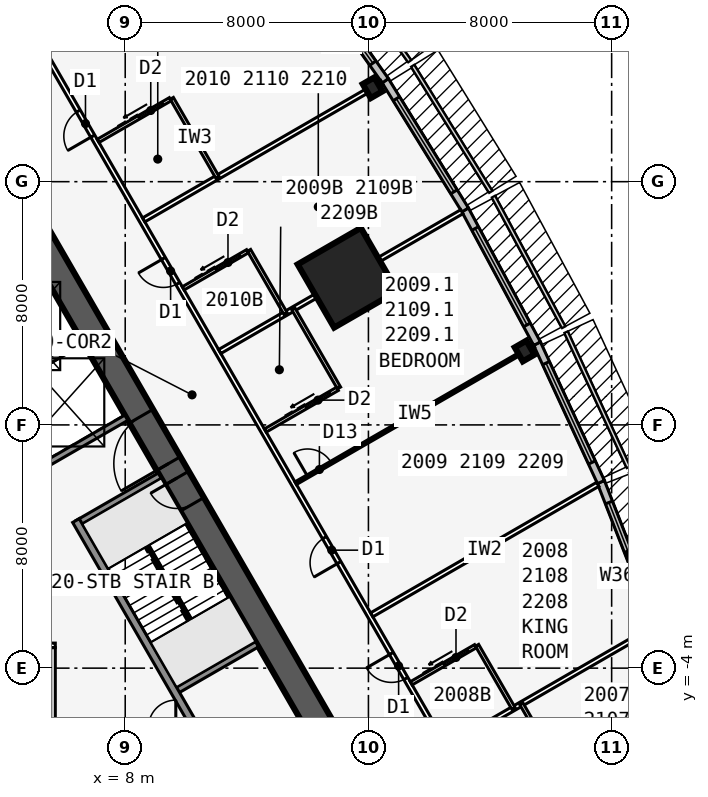
"""IFC4 building model, lengths in metres.
Left out: names, types, materials, properties, quantities, classifications, styles, units other than length and angle.
Written with IfcOpenShell. Run it as: python <this file> out.ifc"""

import sys

from ifc_helpers import new_model, si_unit, direction, frame, frame_2d, origin, origin_2d, place, context, subcontext, project, spatial, rectangle, i_section, extrude, element, fill, save


model = new_model("IFC4")
c1 = context("Model", 3, precision=1e-05, world=origin(), true_north=direction((0.0, 1.0)))
c2 = subcontext(c1, "Body", "Model", "MODEL_VIEW")
j1 = project(units=[si_unit("LENGTHUNIT", "METRE"), si_unit("PLANEANGLEUNIT", "RADIAN")], contexts=[c1])
p1 = place(None, origin())
s1 = spatial("IfcSite", under=j1, at=p1, CompositionType="ELEMENT")
p2 = place(p1, origin())
s2 = spatial("IfcBuilding", under=s1, at=p2, CompositionType="ELEMENT")
p3 = place(p2, frame((0.0, 0.0, 79.5)))
s3 = spatial("IfcBuildingStorey", under=s2, at=p3, CompositionType="ELEMENT", Elevation=79.5)
p4 = place(p3, frame((16.5, -9.526, 0.0), z_axis=(0.0, 0.0, 1.0), x_axis=(-0.499999749417, 0.866025548458, 0.0)))
e1 = element("IfcWall", 1, at=p4, inside=s3, PredefinedType="SHEAR", context=c2, shape_type="SweptSolid", body=[
    extrude(rectangle(XDim=33.0, YDim=0.9, at=frame_2d((16.5, 0.0))), origin(), (0.0, 0.0, 1.0), 3.4),
])
p5 = place(p4, frame((14.15, 0.0, 0.0)))
e2 = element("IfcOpeningElement", 2, at=p5, cuts=e1, PredefinedType="OPENING", context=c2, shape_type="SweptSolid", body=[
    extrude(rectangle(XDim=1.8, YDim=2.13, at=frame_2d((0.9, 1.065))), frame((0.0, 0.46, 0.0), z_axis=(0.0, -1.0, 0.0), x_axis=(1.0, 0.0, 0.0)), (0.0, 0.0, 1.0), 0.92),
])
p6 = place(p4, frame((12.6, 0.0, 0.0)))
e3 = element("IfcOpeningElement", 3, at=p6, cuts=e1, PredefinedType="OPENING", context=c2, shape_type="SweptSolid", body=[
    extrude(rectangle(XDim=1.0, YDim=2.13, at=frame_2d((0.5, 1.065))), frame((0.0, 0.46, 0.0), z_axis=(0.0, -1.0, 0.0), x_axis=(1.0, 0.0, 0.0)), (0.0, 0.0, 1.0), 0.92),
])
p7 = place(p3, frame((10.245, -5.843, 0.0), z_axis=(0.0, 0.0, 1.0), x_axis=(-0.499993009313, 0.866029439822, 0.0)))
e4 = element("IfcWall", 4, at=p7, inside=s3, PredefinedType="SOLIDWALL", context=c2, shape_type="SweptSolid", body=[
    extrude(rectangle(XDim=7.733, YDim=0.25, at=frame_2d((3.866, 0.0))), origin(), (0.0, 0.0, 1.0), 3.235),
])
for number, where, z_axis, x_axis in (
    (5, (9.629, -4.775, 0.0), (0.0, 0.0, 1.0), (0.866, 0.5, 0.0)),
    (6, (6.429, 0.767, 0.0), (0.0, 0.0, 1.0), (0.866, 0.5, 0.0)),
    (7, (5.329, 2.673, 0.0), (0.0, 0.0, 1.0), (0.866, 0.5, 0.0)),
    (8, (3.879, 5.184, 0.0), (0.0, 0.0, 1.0), (0.866, 0.5, 0.0)),
):
    element("IfcWall", number, at=place(p3, frame(where, z_axis=z_axis, x_axis=x_axis)), inside=s3, PredefinedType="SOLIDWALL", context=c2, shape_type="SweptSolid", body=[
        extrude(rectangle(XDim=3.125, YDim=0.2, at=frame_2d((1.562, 0.0))), origin(), (0.0, 0.0, 1.0), 3.235),
    ])
for number, where, z_axis, x_axis in (
    (9, (21.137, 6.43, 0.0), (0.0, 0.0, 1.0), (0.866, 0.5, 0.0)),
    (10, (16.137, 15.09, 0.0), (0.0, 0.0, 1.0), (0.866, 0.5, 0.0)),
):
    element("IfcColumn", number, at=place(p3, frame(where, z_axis=z_axis, x_axis=x_axis)), inside=s3, PredefinedType="COLUMN", context=c2, shape_type="SweptSolid", body=[
        extrude(i_section(OverallWidth=0.442, OverallDepth=0.531, WebThickness=0.066, FlangeThickness=0.106, at=origin_2d()), origin(), (0.0, 0.0, 1.0), 3.4),
    ])
p8 = place(p3, frame((15.312, 8.84, 0.0), z_axis=(0.0, 0.0, 1.0), x_axis=(0.866025403784, 0.5, 0.0)))
e11 = element("IfcColumn", 11, at=p8, inside=s3, PredefinedType="COLUMN", context=c2, shape_type="SweptSolid", body=[
    extrude(rectangle(XDim=2.4, YDim=2.4, at=origin_2d()), origin(), (0.0, 0.0, 1.0), 3.4),
])
p9 = place(p3, frame((25.486, -2.584, 0.0), z_axis=(0.0, 0.0, 1.0), x_axis=(-0.364013463868, 0.931393685894, 0.0)))
e12 = element("IfcWall", 12, at=p9, inside=s3, PredefinedType="STANDARD", context=c2, shape_type="SweptSolid", body=[
    extrude(rectangle(XDim=5.058, YDim=0.25, at=frame_2d((2.529, 0.0))), origin(), (0.0, 0.0, 1.0), 3.235),
])
p10 = place(p9, frame((0.729, 0.0, 0.45)))
e13 = element("IfcOpeningElement", 13, at=p10, cuts=e12, PredefinedType="OPENING", context=c2, shape_type="SweptSolid", body=[
    extrude(rectangle(XDim=3.6, YDim=2.4, at=frame_2d((1.8, 1.2))), frame((0.0, 0.135, 0.0), z_axis=(0.0, -1.0, 0.0), x_axis=(1.0, 0.0, 0.0)), (0.0, 0.0, 1.0), 0.27),
])
p11 = place(p3, frame((23.648, 2.119, 0.0), z_axis=(0.0, 0.0, 1.0), x_axis=(-0.419203100754, 0.907892482796, 0.0)))
e14 = element("IfcWall", 14, at=p11, inside=s3, PredefinedType="STANDARD", context=c2, shape_type="SweptSolid", body=[
    extrude(rectangle(XDim=5.021, YDim=0.25, at=frame_2d((2.51, 0.0))), origin(), (0.0, 0.0, 1.0), 3.235),
])
p12 = place(p11, frame((0.71, 0.0, 0.45)))
e15 = element("IfcOpeningElement", 15, at=p12, cuts=e14, PredefinedType="OPENING", context=c2, shape_type="SweptSolid", body=[
    extrude(rectangle(XDim=3.6, YDim=2.4, at=frame_2d((1.8, 1.2))), frame((0.0, 0.135, 0.0), z_axis=(0.0, -1.0, 0.0), x_axis=(1.0, 0.0, 0.0)), (0.0, 0.0, 1.0), 0.27),
])
p13 = place(p3, frame((21.547, 6.671, 0.0), z_axis=(0.0, 0.0, 1.0), x_axis=(-0.473412820489, 0.880840678782, 0.0)))
e16 = element("IfcWall", 16, at=p13, inside=s3, PredefinedType="STANDARD", context=c2, shape_type="SweptSolid", body=[
    extrude(rectangle(XDim=5.002, YDim=0.25, at=frame_2d((2.501, 0.0))), origin(), (0.0, 0.0, 1.0), 3.235),
])
p14 = place(p13, frame((0.701, 0.0, 0.45)))
e17 = element("IfcOpeningElement", 17, at=p14, cuts=e16, PredefinedType="OPENING", context=c2, shape_type="SweptSolid", body=[
    extrude(rectangle(XDim=3.6, YDim=2.4, at=frame_2d((1.8, 1.2))), frame((0.0, 0.135, 0.0), z_axis=(0.0, -1.0, 0.0), x_axis=(1.0, 0.0, 0.0)), (0.0, 0.0, 1.0), 0.27),
])
p15 = place(p3, frame((19.182, 11.071, 0.0), z_axis=(0.0, 0.0, 1.0), x_axis=(-0.526132807704, 0.850402415717, 0.0)))
e18 = element("IfcWall", 18, at=p15, inside=s3, PredefinedType="STANDARD", context=c2, shape_type="SweptSolid", body=[
    extrude(rectangle(XDim=5.002, YDim=0.25, at=frame_2d((2.501, 0.0))), origin(), (0.0, 0.0, 1.0), 3.235),
])
p16 = place(p15, frame((0.701, 0.0, 0.45)))
e19 = element("IfcOpeningElement", 19, at=p16, cuts=e18, PredefinedType="OPENING", context=c2, shape_type="SweptSolid", body=[
    extrude(rectangle(XDim=3.6, YDim=2.4, at=frame_2d((1.8, 1.2))), frame((0.0, 0.135, 0.0), z_axis=(0.0, -1.0, 0.0), x_axis=(1.0, 0.0, 0.0)), (0.0, 0.0, 1.0), 0.27),
])
p17 = place(p3, frame((16.555, 15.318, 0.0), z_axis=(0.0, 0.0, 1.0), x_axis=(-0.5766431066, 0.81699616132, 0.0)))
e20 = element("IfcWall", 20, at=p17, inside=s3, PredefinedType="STANDARD", context=c2, shape_type="SweptSolid", body=[
    extrude(rectangle(XDim=5.021, YDim=0.25, at=frame_2d((2.51, 0.0))), origin(), (0.0, 0.0, 1.0), 3.235),
])
p18 = place(p17, frame((0.71, 0.0, 0.45)))
e21 = element("IfcOpeningElement", 21, at=p18, cuts=e20, PredefinedType="OPENING", context=c2, shape_type="SweptSolid", body=[
    extrude(rectangle(XDim=3.6, YDim=2.4, at=frame_2d((1.8, 1.2))), frame((0.0, 0.135, 0.0), z_axis=(0.0, -1.0, 0.0), x_axis=(1.0, 0.0, 0.0)), (0.0, 0.0, 1.0), 0.27),
])
p19 = place(p3, frame((21.586, -11.885, 0.0), z_axis=(0.0, 0.0, 1.0), x_axis=(-0.500001915564, 0.86602429783, 0.0)))
e22 = element("IfcWall", 22, at=p19, inside=s3, PredefinedType="PARTITIONING", context=c2, shape_type="SweptSolid", body=[
    extrude(rectangle(XDim=42.172, YDim=0.15, at=frame_2d((21.086, 0.0))), origin(), (0.0, 0.0, 1.0), 3.235),
])
p20 = place(p19, frame((1.911, 0.0, 0.0)))
e23 = element("IfcOpeningElement", 23, at=p20, cuts=e22, PredefinedType="OPENING", context=c2, shape_type="SweptSolid", body=[
    extrude(rectangle(XDim=0.95, YDim=2.13, at=frame_2d((0.475, 1.065))), frame((0.0, 0.085, 0.0), z_axis=(0.0, -1.0, 0.0), x_axis=(1.0, 0.0, 0.0)), (0.0, 0.0, 1.0), 0.17),
])
p21 = place(p19, frame((8.711, 0.0, 0.0)))
e24 = element("IfcOpeningElement", 24, at=p21, cuts=e22, PredefinedType="OPENING", context=c2, shape_type="SweptSolid", body=[
    extrude(rectangle(XDim=0.95, YDim=2.13, at=frame_2d((0.475, 1.065))), frame((0.0, 0.085, 0.0), z_axis=(0.0, -1.0, 0.0), x_axis=(1.0, 0.0, 0.0)), (0.0, 0.0, 1.0), 0.17),
])
p22 = place(p19, frame((13.111, 0.0, 0.0)))
e25 = element("IfcOpeningElement", 25, at=p22, cuts=e22, PredefinedType="OPENING", context=c2, shape_type="SweptSolid", body=[
    extrude(rectangle(XDim=0.95, YDim=2.13, at=frame_2d((0.475, 1.065))), frame((0.0, 0.085, 0.0), z_axis=(0.0, -1.0, 0.0), x_axis=(1.0, 0.0, 0.0)), (0.0, 0.0, 1.0), 0.17),
])
p23 = place(p19, frame((23.711, 0.0, 0.0)))
e26 = element("IfcOpeningElement", 26, at=p23, cuts=e22, PredefinedType="OPENING", context=c2, shape_type="SweptSolid", body=[
    extrude(rectangle(XDim=0.95, YDim=2.13, at=frame_2d((0.475, 1.065))), frame((0.0, 0.085, 0.0), z_axis=(0.0, -1.0, 0.0), x_axis=(1.0, 0.0, 0.0)), (0.0, 0.0, 1.0), 0.17),
])
p24 = place(p19, frame((29.311, 0.0, 0.0)))
e27 = element("IfcOpeningElement", 27, at=p24, cuts=e22, PredefinedType="OPENING", context=c2, shape_type="SweptSolid", body=[
    extrude(rectangle(XDim=0.95, YDim=2.13, at=frame_2d((0.475, 1.065))), frame((0.0, 0.085, 0.0), z_axis=(0.0, -1.0, 0.0), x_axis=(1.0, 0.0, 0.0)), (0.0, 0.0, 1.0), 0.17),
])
p25 = place(p19, frame((39.311, 0.0, 0.0)))
e28 = element("IfcOpeningElement", 28, at=p25, cuts=e22, PredefinedType="OPENING", context=c2, shape_type="SweptSolid", body=[
    extrude(rectangle(XDim=0.95, YDim=2.13, at=frame_2d((0.475, 1.065))), frame((0.0, 0.085, 0.0), z_axis=(0.0, -1.0, 0.0), x_axis=(1.0, 0.0, 0.0)), (0.0, 0.0, 1.0), 0.17),
])
p26 = place(p3, frame((18.608, -6.577, 0.0), z_axis=(0.0, 0.0, 1.0), x_axis=(0.866034818847, 0.499983692279, 0.0)))
e29 = element("IfcWall", 29, at=p26, inside=s3, PredefinedType="PARTITIONING", context=c2, shape_type="SweptSolid", body=[
    extrude(rectangle(XDim=7.82, YDim=0.15, at=frame_2d((3.91, 0.0))), origin(), (0.0, 0.0, 1.0), 2.389),
])
p27 = place(p3, frame((16.108, -2.247, 0.0), z_axis=(0.0, 0.0, 1.0), x_axis=(0.866018881988, 0.500011295912, 0.0)))
e30 = element("IfcWall", 30, at=p27, inside=s3, PredefinedType="PARTITIONING", context=c2, shape_type="SweptSolid", body=[
    extrude(rectangle(XDim=8.585, YDim=0.15, at=frame_2d((4.292, 0.0))), origin(), (0.0, 0.0, 1.0), 2.389),
])
p28 = place(p3, frame((13.608, 2.083, 0.0), z_axis=(0.0, 0.0, 1.0), x_axis=(0.866028232062, 0.499995101247, 0.0)))
e31 = element("IfcWall", 31, at=p28, inside=s3, PredefinedType="PARTITIONING", context=c2, shape_type="SweptSolid", body=[
    extrude(rectangle(XDim=9.043, YDim=0.1, at=frame_2d((4.521, 0.0))), origin(), (0.0, 0.0, 1.0), 2.389),
])
p29 = place(p28, frame((0.45, 0.0, 0.0)))
e32 = element("IfcOpeningElement", 32, at=p29, cuts=e31, PredefinedType="OPENING", context=c2, shape_type="SweptSolid", body=[
    extrude(rectangle(XDim=0.9, YDim=2.13, at=frame_2d((0.45, 1.065))), frame((0.0, 0.06, 0.0), z_axis=(0.0, -1.0, 0.0), x_axis=(1.0, 0.0, 0.0)), (0.0, 0.0, 1.0), 0.12),
])
p30 = place(p3, frame((11.108, 6.413, 0.0), z_axis=(0.0, 0.0, 1.0), x_axis=(0.866022450903, 0.500005114506, 0.0)))
e33 = element("IfcWall", 33, at=p30, inside=s3, PredefinedType="PARTITIONING", context=c2, shape_type="SweptSolid", body=[
    extrude(rectangle(XDim=9.196, YDim=0.15, at=frame_2d((4.598, 0.0))), origin(), (0.0, 0.0, 1.0), 2.389),
])
p31 = place(p3, frame((8.608, 10.743, 0.0), z_axis=(0.0, 0.0, 1.0), x_axis=(0.866028232062, 0.499995101247, 0.0)))
e34 = element("IfcWall", 34, at=p31, inside=s3, PredefinedType="PARTITIONING", context=c2, shape_type="SweptSolid", body=[
    extrude(rectangle(XDim=9.043, YDim=0.15, at=frame_2d((4.521, 0.0))), origin(), (0.0, 0.0, 1.0), 2.389),
])
p32 = place(p3, frame((22.533, -7.775, 0.0), z_axis=(0.0, 0.0, 1.0), x_axis=(-0.499990139034, 0.866031096941, 0.0)))
e35 = element("IfcWall", 35, at=p32, inside=s3, PredefinedType="PLUMBINGWALL", context=c2, shape_type="SweptSolid", body=[
    extrude(rectangle(XDim=3.0, YDim=0.12, at=frame_2d((1.5, 0.0))), origin(), (0.0, 0.0, 1.0), 3.235),
])
p33 = place(p3, frame((20.773, -5.327, 0.0), z_axis=(0.0, 0.0, 1.0), x_axis=(-0.500001309137, 0.866024647952, 0.0)))
e36 = element("IfcWall", 36, at=p33, inside=s3, PredefinedType="PLUMBINGWALL", context=c2, shape_type="SweptSolid", body=[
    extrude(rectangle(XDim=2.4, YDim=0.12, at=frame_2d((1.2, 0.0))), origin(), (0.0, 0.0, 1.0), 3.235),
])
p34 = place(p3, frame((17.408, -4.499, 0.0), z_axis=(0.0, 0.0, 1.0), x_axis=(0.866023955769, 0.500002508028, 0.0)))
e37 = element("IfcWall", 37, at=p34, inside=s3, PredefinedType="PLUMBINGWALL", context=c2, shape_type="SweptSolid", body=[
    extrude(rectangle(XDim=2.44, YDim=0.12, at=frame_2d((1.22, 0.0))), origin(), (0.0, 0.0, 1.0), 3.235),
])
p35 = place(p34, frame((1.25, 0.0, 0.0)))
e38 = element("IfcOpeningElement", 38, at=p35, cuts=e37, PredefinedType="OPENING", context=c2, shape_type="SweptSolid", body=[
    extrude(rectangle(XDim=0.9, YDim=2.13, at=frame_2d((0.45, 1.065))), frame((0.0, 0.07, 0.0), z_axis=(0.0, -1.0, 0.0), x_axis=(1.0, 0.0, 0.0)), (0.0, 0.0, 1.0), 0.14),
])
p36 = place(p3, frame((15.033, 5.215, 0.0), z_axis=(0.0, 0.0, 1.0), x_axis=(-0.50002537861, 0.866010750942, 0.0)))
e39 = element("IfcWall", 39, at=p36, inside=s3, PredefinedType="PLUMBINGWALL", context=c2, shape_type="SweptSolid", body=[
    extrude(rectangle(XDim=3.0, YDim=0.12, at=frame_2d((1.5, 0.0))), origin(), (0.0, 0.0, 1.0), 3.235),
])
p37 = place(p3, frame((12.608, 3.815, 0.0), z_axis=(0.0, 0.0, 1.0), x_axis=(0.866035715982, 0.499982138324, 0.0)))
e40 = element("IfcWall", 40, at=p37, inside=s3, PredefinedType="PLUMBINGWALL", context=c2, shape_type="SweptSolid", body=[
    extrude(rectangle(XDim=2.74, YDim=0.12, at=frame_2d((1.37, 0.0))), origin(), (0.0, 0.0, 1.0), 3.235),
])
p38 = place(p37, frame((1.55, 0.0, 0.0)))
e41 = element("IfcOpeningElement", 41, at=p38, cuts=e40, PredefinedType="OPENING", context=c2, shape_type="SweptSolid", body=[
    extrude(rectangle(XDim=0.9, YDim=2.13, at=frame_2d((0.45, 1.065))), frame((0.0, 0.07, 0.0), z_axis=(0.0, -1.0, 0.0), x_axis=(1.0, 0.0, 0.0)), (0.0, 0.0, 1.0), 0.14),
])
p39 = place(p3, frame((13.273, 7.663, 0.0), z_axis=(0.0, 0.0, 1.0), x_axis=(-0.499957262057, 0.866050077142, 0.0)))
e42 = element("IfcWall", 42, at=p39, inside=s3, PredefinedType="PLUMBINGWALL", context=c2, shape_type="SweptSolid", body=[
    extrude(rectangle(XDim=2.4, YDim=0.12, at=frame_2d((1.2, 0.0))), origin(), (0.0, 0.0, 1.0), 3.235),
])
p40 = place(p3, frame((9.908, 8.492, 0.0), z_axis=(0.0, 0.0, 1.0), x_axis=(0.866023955769, 0.500002508028, 0.0)))
e43 = element("IfcWall", 43, at=p40, inside=s3, PredefinedType="PLUMBINGWALL", context=c2, shape_type="SweptSolid", body=[
    extrude(rectangle(XDim=2.44, YDim=0.12, at=frame_2d((1.22, 0.0))), origin(), (0.0, 0.0, 1.0), 3.235),
])
p41 = place(p40, frame((1.25, 0.0, 0.0)))
e44 = element("IfcOpeningElement", 44, at=p41, cuts=e43, PredefinedType="OPENING", context=c2, shape_type="SweptSolid", body=[
    extrude(rectangle(XDim=0.9, YDim=2.13, at=frame_2d((0.45, 1.065))), frame((0.0, 0.07, 0.0), z_axis=(0.0, -1.0, 0.0), x_axis=(1.0, 0.0, 0.0)), (0.0, 0.0, 1.0), 0.14),
])
p42 = place(p3, frame((11.033, 12.143, 0.0), z_axis=(0.0, 0.0, 1.0), x_axis=(-0.50002537861, 0.866010750942, 0.0)))
e45 = element("IfcWall", 45, at=p42, inside=s3, PredefinedType="PLUMBINGWALL", context=c2, shape_type="SweptSolid", body=[
    extrude(rectangle(XDim=3.0, YDim=0.12, at=frame_2d((1.5, 0.0))), origin(), (0.0, 0.0, 1.0), 3.235),
])
p43 = place(p3, frame((7.108, 13.341, 0.0), z_axis=(0.0, 0.0, 1.0), x_axis=(0.866035715982, 0.499982138324, 0.0)))
e46 = element("IfcWall", 46, at=p43, inside=s3, PredefinedType="PLUMBINGWALL", context=c2, shape_type="SweptSolid", body=[
    extrude(rectangle(XDim=2.74, YDim=0.12, at=frame_2d((1.37, 0.0))), origin(), (0.0, 0.0, 1.0), 3.235),
])
p44 = place(p43, frame((1.55, 0.0, 0.0)))
e47 = element("IfcOpeningElement", 47, at=p44, cuts=e46, PredefinedType="OPENING", context=c2, shape_type="SweptSolid", body=[
    extrude(rectangle(XDim=0.9, YDim=2.13, at=frame_2d((0.45, 1.065))), frame((0.0, 0.07, 0.0), z_axis=(0.0, -1.0, 0.0), x_axis=(1.0, 0.0, 0.0)), (0.0, 0.0, 1.0), 0.14),
])
p45 = place(p3, frame((-2.65, -3.251, 0.0), z_axis=(0.0, 0.0, 1.0), x_axis=(1.0, 0.0, 0.0)))
e48 = element("IfcWall", 48, at=p45, inside=s3, PredefinedType="PARTITIONING", context=c2, shape_type="SweptSolid", body=[
    extrude(rectangle(XDim=8.35, YDim=0.15, at=frame_2d((4.175, 0.0))), origin(), (0.0, 0.0, 1.0), 3.235),
])
p46 = place(p3, frame((5.625, -5.826, 0.0), z_axis=(0.0, 0.0, 1.0), x_axis=(0.0, 1.0, 0.0)))
e49 = element("IfcWall", 49, at=p46, inside=s3, PredefinedType="PARTITIONING", context=c2, shape_type="SweptSolid", body=[
    extrude(rectangle(XDim=2.5, YDim=0.15, at=frame_2d((1.25, 0.0))), origin(), (0.0, 0.0, 1.0), 3.235),
])
p47 = place(p3, frame((10.135, -2.401, 0.0), z_axis=(0.0, 0.0, 1.0), x_axis=(-0.499992232847, 0.866029888106, 0.0)))
e50 = element("IfcWall", 50, at=p47, inside=s3, PredefinedType="SOLIDWALL", context=c2, shape_type="SweptSolid", body=[
    extrude(rectangle(XDim=2.794, YDim=0.1, at=frame_2d((1.397, 0.0))), origin(), (0.0, 0.0, 1.0), 3.4),
])
p48 = place(p10, origin())
e51 = element("IfcWindow", 51, at=p48, inside=s3, PartitioningType="SINGLE_PANEL", PredefinedType="WINDOW", context=c2, shape_type="SweptSolid", body=[
    extrude(rectangle(XDim=3.6, YDim=2.4, at=frame_2d((1.8, 1.2))), frame((0.0, 0.03, 0.0), z_axis=(0.0, -1.0, 0.0), x_axis=(1.0, 0.0, 0.0)), (0.0, 0.0, 1.0), 0.06),
])
fill(e13, e51)
p49 = place(p12, origin())
e52 = element("IfcWindow", 52, at=p49, inside=s3, PartitioningType="SINGLE_PANEL", PredefinedType="WINDOW", context=c2, shape_type="SweptSolid", body=[
    extrude(rectangle(XDim=3.6, YDim=2.4, at=frame_2d((1.8, 1.2))), frame((0.0, 0.03, 0.0), z_axis=(0.0, -1.0, 0.0), x_axis=(1.0, 0.0, 0.0)), (0.0, 0.0, 1.0), 0.06),
])
fill(e15, e52)
p50 = place(p14, origin())
e53 = element("IfcWindow", 53, at=p50, inside=s3, PartitioningType="SINGLE_PANEL", PredefinedType="WINDOW", context=c2, shape_type="SweptSolid", body=[
    extrude(rectangle(XDim=3.6, YDim=2.4, at=frame_2d((1.8, 1.2))), frame((0.0, 0.03, 0.0), z_axis=(0.0, -1.0, 0.0), x_axis=(1.0, 0.0, 0.0)), (0.0, 0.0, 1.0), 0.06),
])
fill(e17, e53)
p51 = place(p16, origin())
e54 = element("IfcWindow", 54, at=p51, inside=s3, PartitioningType="SINGLE_PANEL", PredefinedType="WINDOW", context=c2, shape_type="SweptSolid", body=[
    extrude(rectangle(XDim=3.6, YDim=2.4, at=frame_2d((1.8, 1.2))), frame((0.0, 0.03, 0.0), z_axis=(0.0, -1.0, 0.0), x_axis=(1.0, 0.0, 0.0)), (0.0, 0.0, 1.0), 0.06),
])
fill(e19, e54)
p52 = place(p18, origin())
e55 = element("IfcWindow", 55, at=p52, inside=s3, PartitioningType="SINGLE_PANEL", PredefinedType="WINDOW", context=c2, shape_type="SweptSolid", body=[
    extrude(rectangle(XDim=3.6, YDim=2.4, at=frame_2d((1.8, 1.2))), frame((0.0, 0.03, 0.0), z_axis=(0.0, -1.0, 0.0), x_axis=(1.0, 0.0, 0.0)), (0.0, 0.0, 1.0), 0.06),
])
fill(e21, e55)
p53 = place(p29, origin())
e56 = element("IfcDoor", 56, at=p53, inside=s3, OperationType="SINGLE_SWING_LEFT", PredefinedType="DOOR", context=c2, shape_type="SweptSolid", body=[
    extrude(rectangle(XDim=0.9, YDim=2.13, at=frame_2d((0.45, 1.065))), frame((0.0, 0.025, 0.0), z_axis=(0.0, -1.0, 0.0), x_axis=(1.0, 0.0, 0.0)), (0.0, 0.0, 1.0), 0.05),
])
fill(e32, e56)
p54 = place(p35, origin())
e57 = element("IfcDoor", 57, at=p54, inside=s3, OperationType="SLIDING_TO_LEFT", PredefinedType="DOOR", context=c2, shape_type="SweptSolid", body=[
    extrude(rectangle(XDim=0.9, YDim=2.13, at=frame_2d((0.45, 1.065))), frame((0.0, 0.025, 0.0), z_axis=(0.0, -1.0, 0.0), x_axis=(1.0, 0.0, 0.0)), (0.0, 0.0, 1.0), 0.05),
])
fill(e38, e57)
p55 = place(p21, origin())
e58 = element("IfcDoor", 58, at=p55, inside=s3, OperationType="SINGLE_SWING_RIGHT", PredefinedType="DOOR", context=c2, shape_type="SweptSolid", body=[
    extrude(rectangle(XDim=0.95, YDim=2.13, at=frame_2d((0.475, 1.065))), frame((0.0, 0.025, 0.0), z_axis=(0.0, -1.0, 0.0), x_axis=(1.0, 0.0, 0.0)), (0.0, 0.0, 1.0), 0.05),
])
fill(e24, e58)
p56 = place(p22, origin())
e59 = element("IfcDoor", 59, at=p56, inside=s3, OperationType="SINGLE_SWING_LEFT", PredefinedType="DOOR", context=c2, shape_type="SweptSolid", body=[
    extrude(rectangle(XDim=0.95, YDim=2.13, at=frame_2d((0.475, 1.065))), frame((0.0, 0.025, 0.0), z_axis=(0.0, -1.0, 0.0), x_axis=(1.0, 0.0, 0.0)), (0.0, 0.0, 1.0), 0.05),
])
fill(e25, e59)
p57 = place(p38, origin())
e60 = element("IfcDoor", 60, at=p57, inside=s3, OperationType="SLIDING_TO_LEFT", PredefinedType="DOOR", context=c2, shape_type="SweptSolid", body=[
    extrude(rectangle(XDim=0.9, YDim=2.13, at=frame_2d((0.45, 1.065))), frame((0.0, 0.025, 0.0), z_axis=(0.0, -1.0, 0.0), x_axis=(1.0, 0.0, 0.0)), (0.0, 0.0, 1.0), 0.05),
])
fill(e41, e60)
p58 = place(p41, origin())
e61 = element("IfcDoor", 61, at=p58, inside=s3, OperationType="SLIDING_TO_LEFT", PredefinedType="DOOR", context=c2, shape_type="SweptSolid", body=[
    extrude(rectangle(XDim=0.9, YDim=2.13, at=frame_2d((0.45, 1.065))), frame((0.0, 0.025, 0.0), z_axis=(0.0, -1.0, 0.0), x_axis=(1.0, 0.0, 0.0)), (0.0, 0.0, 1.0), 0.05),
])
fill(e44, e61)
p59 = place(p23, origin())
e62 = element("IfcDoor", 62, at=p59, inside=s3, OperationType="SINGLE_SWING_RIGHT", PredefinedType="DOOR", context=c2, shape_type="SweptSolid", body=[
    extrude(rectangle(XDim=0.95, YDim=2.13, at=frame_2d((0.475, 1.065))), frame((0.0, 0.025, 0.0), z_axis=(0.0, -1.0, 0.0), x_axis=(1.0, 0.0, 0.0)), (0.0, 0.0, 1.0), 0.05),
])
fill(e26, e62)
p60 = place(p44, origin())
e63 = element("IfcDoor", 63, at=p60, inside=s3, OperationType="SLIDING_TO_LEFT", PredefinedType="DOOR", context=c2, shape_type="SweptSolid", body=[
    extrude(rectangle(XDim=0.9, YDim=2.13, at=frame_2d((0.45, 1.065))), frame((0.0, 0.025, 0.0), z_axis=(0.0, -1.0, 0.0), x_axis=(1.0, 0.0, 0.0)), (0.0, 0.0, 1.0), 0.05),
])
fill(e47, e63)
p61 = place(p24, origin())
e64 = element("IfcDoor", 64, at=p61, inside=s3, OperationType="SINGLE_SWING_LEFT", PredefinedType="DOOR", context=c2, shape_type="SweptSolid", body=[
    extrude(rectangle(XDim=0.95, YDim=2.13, at=frame_2d((0.475, 1.065))), frame((0.0, 0.025, 0.0), z_axis=(0.0, -1.0, 0.0), x_axis=(1.0, 0.0, 0.0)), (0.0, 0.0, 1.0), 0.05),
])
fill(e27, e64)
p62 = place(p5, origin())
e65 = element("IfcDoor", 65, at=p62, inside=s3, OperationType="DOUBLE_DOOR_SINGLE_SWING", PredefinedType="DOOR", context=c2, shape_type="SweptSolid", body=[
    extrude(rectangle(XDim=1.8, YDim=2.13, at=frame_2d((0.9, 1.065))), frame((0.0, 0.025, 0.0), z_axis=(0.0, -1.0, 0.0), x_axis=(1.0, 0.0, 0.0)), (0.0, 0.0, 1.0), 0.05),
])
fill(e2, e65)
p63 = place(p6, origin())
e66 = element("IfcDoor", 66, at=p63, inside=s3, OperationType="SINGLE_SWING_RIGHT", PredefinedType="DOOR", context=c2, shape_type="SweptSolid", body=[
    extrude(rectangle(XDim=1.0, YDim=2.13, at=frame_2d((0.5, 1.065))), frame((0.0, 0.025, 0.0), z_axis=(0.0, -1.0, 0.0), x_axis=(1.0, 0.0, 0.0)), (0.0, 0.0, 1.0), 0.05),
])
fill(e3, e66)
save(model, sys.argv[1])
